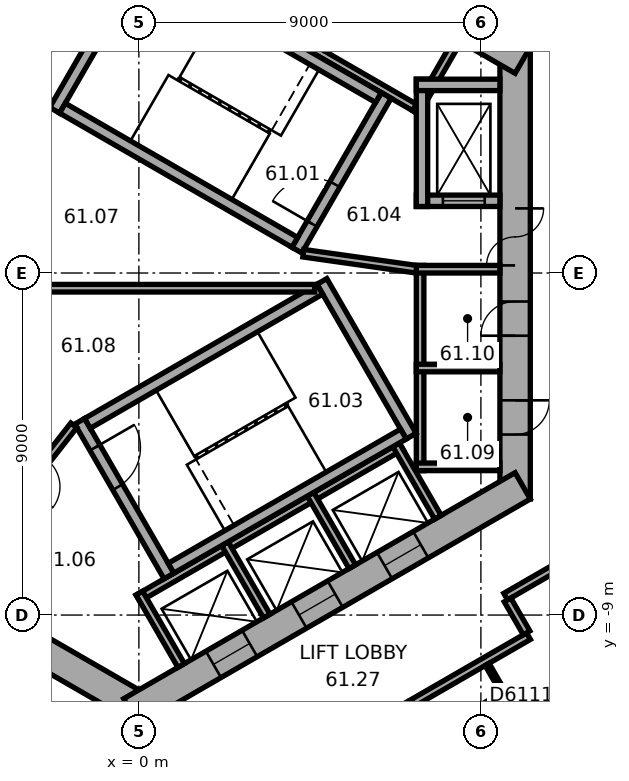
"""IFC4 building model, lengths in metres.
Left out: names, types, materials, properties, quantities, classifications, styles, units other than length and angle.
Written with IfcOpenShell. Run it as: python <this file> out.ifc"""

import sys

from ifc_helpers import new_model, si_unit, direction, frame, frame_2d, origin, place, context, subcontext, project, spatial, rectangle, extrude, element, fill, save


model = new_model("IFC4")
c1 = context("Model", 3, precision=1e-05, world=origin(), true_north=direction((0.0, 1.0)))
c2 = subcontext(c1, "Body", "Model", "MODEL_VIEW")
j1 = project(units=[si_unit("LENGTHUNIT", "METRE"), si_unit("PLANEANGLEUNIT", "RADIAN")], contexts=[c1])
p1 = place(None, origin())
s1 = spatial("IfcSite", under=j1, at=p1, CompositionType="ELEMENT")
p2 = place(p1, origin())
s2 = spatial("IfcBuilding", under=s1, at=p2, CompositionType="ELEMENT")
p3 = place(p2, frame((0.0, 0.0, 247.6)))
s3 = spatial("IfcBuildingStorey", under=s2, at=p3, CompositionType="ELEMENT", Elevation=247.6)
p4 = place(p3, frame((9.9, -5.947, 0.0), z_axis=(0.0, 0.0, 1.0), x_axis=(0.0, 1.0, 0.0)))
e1 = element("IfcWall", 1, at=p4, inside=s3, PredefinedType="SHEAR", context=c2, shape_type="SweptSolid", body=[
    extrude(rectangle(XDim=11.894, YDim=0.8, at=frame_2d((5.947, 0.0))), origin(), (0.0, 0.0, 1.0), 3.7),
])
p5 = place(p4, frame((6.147, 0.0, 0.0)))
e2 = element("IfcOpeningElement", 2, at=p5, cuts=e1, PredefinedType="OPENING", context=c2, shape_type="SweptSolid", body=[
    extrude(rectangle(XDim=1.5, YDim=2.1, at=frame_2d((0.75, 1.05))), frame((0.0, 0.41, 0.0), z_axis=(0.0, -1.0, 0.0), x_axis=(1.0, 0.0, 0.0)), (0.0, 0.0, 1.0), 0.82),
])
p6 = place(p4, frame((1.697, 0.0, 0.0)))
e3 = element("IfcOpeningElement", 3, at=p6, cuts=e1, PredefinedType="OPENING", context=c2, shape_type="SweptSolid", body=[
    extrude(rectangle(XDim=0.9, YDim=2.1, at=frame_2d((0.45, 1.05))), frame((0.0, 0.41, 0.0), z_axis=(0.0, -1.0, 0.0), x_axis=(1.0, 0.0, 0.0)), (0.0, 0.0, 1.0), 0.82),
])
p7 = place(p4, frame((4.297, 0.0, 0.0)))
e4 = element("IfcOpeningElement", 4, at=p7, cuts=e1, PredefinedType="OPENING", context=c2, shape_type="SweptSolid", body=[
    extrude(rectangle(XDim=0.9, YDim=2.1, at=frame_2d((0.45, 1.05))), frame((0.0, 0.41, 0.0), z_axis=(0.0, -1.0, 0.0), x_axis=(1.0, 0.0, 0.0)), (0.0, 0.0, 1.0), 0.82),
])
p8 = place(p3, frame((10.1, 5.6, 0.0), z_axis=(0.0, 0.0, 1.0), x_axis=(-0.866023897231, 0.500002609418, 0.0)))
e5 = element("IfcWall", 5, at=p8, inside=s3, PredefinedType="SHEAR", context=c2, shape_type="SweptSolid", body=[
    extrude(rectangle(XDim=11.894, YDim=0.8, at=frame_2d((5.947, 0.0))), origin(), (0.0, 0.0, 1.0), 3.7),
])
p9 = place(p8, frame((3.897, 0.0, 0.0)))
e6 = element("IfcOpeningElement", 6, at=p9, cuts=e5, PredefinedType="OPENING", context=c2, shape_type="SweptSolid", body=[
    extrude(rectangle(XDim=0.9, YDim=2.1, at=frame_2d((0.45, 1.05))), frame((0.0, 0.41, 0.0), z_axis=(0.0, -1.0, 0.0), x_axis=(1.0, 0.0, 0.0)), (0.0, 0.0, 1.0), 0.82),
])
p10 = place(p8, frame((7.797, 0.0, 0.0)))
e7 = element("IfcOpeningElement", 7, at=p10, cuts=e5, PredefinedType="OPENING", context=c2, shape_type="SweptSolid", body=[
    extrude(rectangle(XDim=0.9, YDim=2.1, at=frame_2d((0.45, 1.05))), frame((0.0, 0.41, 0.0), z_axis=(0.0, -1.0, 0.0), x_axis=(1.0, 0.0, 0.0)), (0.0, 0.0, 1.0), 0.82),
])
p11 = place(p3, frame((0.2, 11.547, 0.0), z_axis=(0.0, 0.0, 1.0), x_axis=(-0.866023897231, -0.500002609418, 0.0)))
e8 = element("IfcWall", 8, at=p11, inside=s3, PredefinedType="SHEAR", context=c2, shape_type="SweptSolid", body=[
    extrude(rectangle(XDim=11.894, YDim=0.8, at=frame_2d((5.947, 0.0))), origin(), (0.0, 0.0, 1.0), 3.7),
])
p12 = place(p11, frame((6.147, 0.0, 0.0)))
e9 = element("IfcOpeningElement", 9, at=p12, cuts=e8, PredefinedType="OPENING", context=c2, shape_type="SweptSolid", body=[
    extrude(rectangle(XDim=1.5, YDim=2.1, at=frame_2d((0.75, 1.05))), frame((0.0, 0.41, 0.0), z_axis=(0.0, -1.0, 0.0), x_axis=(1.0, 0.0, 0.0)), (0.0, 0.0, 1.0), 0.82),
])
p13 = place(p11, frame((1.697, 0.0, 0.0)))
e10 = element("IfcOpeningElement", 10, at=p13, cuts=e8, PredefinedType="OPENING", context=c2, shape_type="SweptSolid", body=[
    extrude(rectangle(XDim=0.9, YDim=2.1, at=frame_2d((0.45, 1.05))), frame((0.0, 0.41, 0.0), z_axis=(0.0, -1.0, 0.0), x_axis=(1.0, 0.0, 0.0)), (0.0, 0.0, 1.0), 0.82),
])
p14 = place(p11, frame((4.297, 0.0, 0.0)))
e11 = element("IfcOpeningElement", 11, at=p14, cuts=e8, PredefinedType="OPENING", context=c2, shape_type="SweptSolid", body=[
    extrude(rectangle(XDim=0.9, YDim=2.1, at=frame_2d((0.45, 1.05))), frame((0.0, 0.41, 0.0), z_axis=(0.0, -1.0, 0.0), x_axis=(1.0, 0.0, 0.0)), (0.0, 0.0, 1.0), 0.82),
])
p15 = place(p3, frame((-10.1, -5.6, 0.0), z_axis=(0.0, 0.0, 1.0), x_axis=(0.866023897231, -0.500002609418, 0.0)))
e12 = element("IfcWall", 12, at=p15, inside=s3, PredefinedType="SHEAR", context=c2, shape_type="SweptSolid", body=[
    extrude(rectangle(XDim=11.894, YDim=0.8, at=frame_2d((5.947, 0.0))), origin(), (0.0, 0.0, 1.0), 3.7),
])
p16 = place(p15, frame((6.147, 0.0, 0.0)))
e13 = element("IfcOpeningElement", 13, at=p16, cuts=e12, PredefinedType="OPENING", context=c2, shape_type="SweptSolid", body=[
    extrude(rectangle(XDim=1.5, YDim=2.1, at=frame_2d((0.75, 1.05))), frame((0.0, 0.41, 0.0), z_axis=(0.0, -1.0, 0.0), x_axis=(1.0, 0.0, 0.0)), (0.0, 0.0, 1.0), 0.82),
])
p17 = place(p15, frame((1.597, 0.0, 0.0)))
e14 = element("IfcOpeningElement", 14, at=p17, cuts=e12, PredefinedType="OPENING", context=c2, shape_type="SweptSolid", body=[
    extrude(rectangle(XDim=1.1, YDim=2.1, at=frame_2d((0.55, 1.05))), frame((0.0, 0.41, 0.0), z_axis=(0.0, -1.0, 0.0), x_axis=(1.0, 0.0, 0.0)), (0.0, 0.0, 1.0), 0.82),
])
p18 = place(p15, frame((4.197, 0.0, 0.0)))
e15 = element("IfcOpeningElement", 15, at=p18, cuts=e12, PredefinedType="OPENING", context=c2, shape_type="SweptSolid", body=[
    extrude(rectangle(XDim=1.1, YDim=2.1, at=frame_2d((0.55, 1.05))), frame((0.0, 0.41, 0.0), z_axis=(0.0, -1.0, 0.0), x_axis=(1.0, 0.0, 0.0)), (0.0, 0.0, 1.0), 0.82),
])
p19 = place(p3, frame((-0.2, -11.547, 0.0), z_axis=(0.0, 0.0, 1.0), x_axis=(0.866023897231, 0.500002609418, 0.0)))
e16 = element("IfcWall", 16, at=p19, inside=s3, PredefinedType="SHEAR", context=c2, shape_type="SweptSolid", body=[
    extrude(rectangle(XDim=11.894, YDim=0.8, at=frame_2d((5.947, 0.0))), origin(), (0.0, 0.0, 1.0), 3.7),
])
p20 = place(p19, frame((2.497, 0.0, 0.0)))
e17 = element("IfcOpeningElement", 17, at=p20, cuts=e16, PredefinedType="OPENING", context=c2, shape_type="SweptSolid", body=[
    extrude(rectangle(XDim=1.1, YDim=2.1, at=frame_2d((0.55, 1.05))), frame((0.0, 0.41, 0.0), z_axis=(0.0, -1.0, 0.0), x_axis=(1.0, 0.0, 0.0)), (0.0, 0.0, 1.0), 0.82),
])
p21 = place(p19, frame((5.097, 0.0, 0.0)))
e18 = element("IfcOpeningElement", 18, at=p21, cuts=e16, PredefinedType="OPENING", context=c2, shape_type="SweptSolid", body=[
    extrude(rectangle(XDim=1.1, YDim=2.1, at=frame_2d((0.55, 1.05))), frame((0.0, 0.41, 0.0), z_axis=(0.0, -1.0, 0.0), x_axis=(1.0, 0.0, 0.0)), (0.0, 0.0, 1.0), 0.82),
])
p22 = place(p19, frame((7.697, 0.0, 0.0)))
e19 = element("IfcOpeningElement", 19, at=p22, cuts=e16, PredefinedType="OPENING", context=c2, shape_type="SweptSolid", body=[
    extrude(rectangle(XDim=1.1, YDim=2.1, at=frame_2d((0.55, 1.05))), frame((0.0, 0.41, 0.0), z_axis=(0.0, -1.0, 0.0), x_axis=(1.0, 0.0, 0.0)), (0.0, 0.0, 1.0), 0.82),
])
p23 = place(p3, frame((7.4, -5.2, 0.0), z_axis=(0.0, 0.0, 1.0), x_axis=(0.0, 1.0, 0.0)))
e20 = element("IfcWall", 20, at=p23, inside=s3, PredefinedType="PARTITIONING", context=c2, shape_type="SweptSolid", body=[
    extrude(rectangle(XDim=5.4, YDim=0.2, at=frame_2d((2.7, 0.0))), origin(), (0.0, 0.0, 1.0), 3.42),
])
for number, where, z_axis, x_axis in (
    (21, (7.3, -5.1, 0.0), (0.0, 0.0, 1.0), (1.0, 0.0, 0.0)),
    (22, (7.3, -2.5, 0.0), (0.0, 0.0, 1.0), (1.0, 0.0, 0.0)),
    (23, (7.3, 0.1, 0.0), (0.0, 0.0, 1.0), (1.0, 0.0, 0.0)),
):
    element("IfcWall", number, at=place(p3, frame(where, z_axis=z_axis, x_axis=x_axis)), inside=s3, PredefinedType="PARTITIONING", context=c2, shape_type="SweptSolid", body=[
        extrude(rectangle(XDim=2.2, YDim=0.2, at=frame_2d((1.1, 0.0))), origin(), (0.0, 0.0, 1.0), 3.42),
    ])
p24 = place(p3, frame((7.424, 4.259, 0.0), z_axis=(0.0, 0.0, 1.0), x_axis=(-0.866026010844, 0.49999894854, 0.0)))
e24 = element("IfcWall", 24, at=p24, inside=s3, PredefinedType="PARTITIONING", context=c2, shape_type="SweptSolid", body=[
    extrude(rectangle(XDim=8.0, YDim=0.2, at=frame_2d((4.0, 0.0))), origin(), (0.0, 0.0, 1.0), 3.42),
])
p25 = place(p3, frame((7.287, 4.222, 0.0), z_axis=(0.0, 0.0, 1.0), x_axis=(0.499946605688, 0.86605622881, 0.0)))
e25 = element("IfcWall", 25, at=p25, inside=s3, PredefinedType="PARTITIONING", context=c2, shape_type="SweptSolid", body=[
    extrude(rectangle(XDim=2.2, YDim=0.2, at=frame_2d((1.1, 0.0))), origin(), (0.0, 0.0, 1.0), 3.42),
])
p26 = place(p3, frame((-0.024, -8.559, 0.0), z_axis=(0.0, 0.0, 1.0), x_axis=(0.866026010844, 0.49999894854, 0.0)))
e26 = element("IfcWall", 26, at=p26, inside=s3, PredefinedType="PARTITIONING", context=c2, shape_type="SweptSolid", body=[
    extrude(rectangle(XDim=8.0, YDim=0.2, at=frame_2d((4.0, 0.0))), origin(), (0.0, 0.0, 1.0), 3.42),
])
for number, where, z_axis, x_axis in (
    (27, (0.013, -8.422, 0.0), (0.0, 0.0, 1.0), (0.5, -0.866, 0.0)),
    (28, (2.264, -7.122, 0.0), (0.0, 0.0, 1.0), (0.5, -0.866, 0.0)),
    (29, (4.516, -5.822, 0.0), (0.0, 0.0, 1.0), (0.5, -0.866, 0.0)),
    (30, (6.768, -4.522, 0.0), (0.0, 0.0, 1.0), (0.5, -0.866, 0.0)),
):
    element("IfcWall", number, at=place(p3, frame(where, z_axis=z_axis, x_axis=x_axis)), inside=s3, PredefinedType="PARTITIONING", context=c2, shape_type="SweptSolid", body=[
        extrude(rectangle(XDim=2.2, YDim=0.2, at=frame_2d((1.1, 0.0))), origin(), (0.0, 0.0, 1.0), 3.42),
    ])
p27 = place(p3, frame((4.158, 0.602, 0.0), z_axis=(0.0, 0.0, 1.0), x_axis=(0.499977259774, 0.866038532462, 0.0)))
e31 = element("IfcWall", 31, at=p27, inside=s3, PredefinedType="SHEAR", context=c2, shape_type="SweptSolid", body=[
    extrude(rectangle(XDim=4.7, YDim=0.3, at=frame_2d((2.35, 0.0))), origin(), (0.0, 0.0, 1.0), 3.42),
])
p28 = place(p27, frame((0.8, 0.0, 0.0)))
e32 = element("IfcOpeningElement", 32, at=p28, cuts=e31, PredefinedType="OPENING", context=c2, shape_type="SweptSolid", body=[
    extrude(rectangle(XDim=1.2, YDim=2.1, at=frame_2d((0.6, 1.05))), frame((0.0, 0.16, 0.0), z_axis=(0.0, -1.0, 0.0), x_axis=(1.0, 0.0, 0.0)), (0.0, 0.0, 1.0), 0.32),
])
p29 = place(p3, frame((-2.216, 4.282, 0.0), z_axis=(0.0, 0.0, 1.0), x_axis=(0.499977259774, 0.866038532462, 0.0)))
e33 = element("IfcWall", 33, at=p29, inside=s3, PredefinedType="SHEAR", context=c2, shape_type="SweptSolid", body=[
    extrude(rectangle(XDim=4.7, YDim=0.3, at=frame_2d((2.35, 0.0))), origin(), (0.0, 0.0, 1.0), 3.42),
])
for number, where, z_axis, x_axis in (
    (34, (4.103, 0.807, 0.0), (0.0, 0.0, 1.0), (-0.866, 0.5, 0.0)),
    (35, (6.303, 4.617, 0.0), (0.0, 0.0, 1.0), (-0.866, 0.5, 0.0)),
):
    element("IfcWall", number, at=place(p3, frame(where, z_axis=z_axis, x_axis=x_axis)), inside=s3, PredefinedType="SHEAR", context=c2, shape_type="SweptSolid", body=[
        extrude(rectangle(XDim=7.06, YDim=0.3, at=frame_2d((3.53, 0.0))), origin(), (0.0, 0.0, 1.0), 3.42),
    ])
p30 = place(p3, frame((-1.558, -3.902, 0.0), z_axis=(0.0, 0.0, 1.0), x_axis=(0.499977259774, -0.866038532462, 0.0)))
e36 = element("IfcWall", 36, at=p30, inside=s3, PredefinedType="SHEAR", context=c2, shape_type="SweptSolid", body=[
    extrude(rectangle(XDim=4.7, YDim=0.3, at=frame_2d((2.35, 0.0))), origin(), (0.0, 0.0, 1.0), 3.42),
])
p31 = place(p30, frame((0.8, 0.0, 0.0)))
e37 = element("IfcOpeningElement", 37, at=p31, cuts=e36, PredefinedType="OPENING", context=c2, shape_type="SweptSolid", body=[
    extrude(rectangle(XDim=1.2, YDim=2.1, at=frame_2d((0.6, 1.05))), frame((0.0, 0.16, 0.0), z_axis=(0.0, -1.0, 0.0), x_axis=(1.0, 0.0, 0.0)), (0.0, 0.0, 1.0), 0.32),
])
p32 = place(p3, frame((4.816, -0.222, 0.0), z_axis=(0.0, 0.0, 1.0), x_axis=(0.499977259774, -0.866038532462, 0.0)))
e38 = element("IfcWall", 38, at=p32, inside=s3, PredefinedType="SHEAR", context=c2, shape_type="SweptSolid", body=[
    extrude(rectangle(XDim=4.7, YDim=0.3, at=frame_2d((2.35, 0.0))), origin(), (0.0, 0.0, 1.0), 3.42),
])
for number, where, z_axis, x_axis in (
    (39, (-1.353, -3.957, 0.0), (0.0, 0.0, 1.0), (0.866, 0.5, 0.0)),
    (40, (0.847, -7.767, 0.0), (0.0, 0.0, 1.0), (0.866, 0.5, 0.0)),
):
    element("IfcWall", number, at=place(p3, frame(where, z_axis=z_axis, x_axis=x_axis)), inside=s3, PredefinedType="SHEAR", context=c2, shape_type="SweptSolid", body=[
        extrude(rectangle(XDim=7.06, YDim=0.3, at=frame_2d((3.53, 0.0))), origin(), (0.0, 0.0, 1.0), 3.42),
    ])
p33 = place(p3, frame((7.3, 1.9, 0.0), z_axis=(0.0, 0.0, 1.0), x_axis=(1.0, 0.0, 0.0)))
e41 = element("IfcWall", 41, at=p33, inside=s3, PredefinedType="SHEAR", context=c2, shape_type="SweptSolid", body=[
    extrude(rectangle(XDim=2.2, YDim=0.3, at=frame_2d((1.1, 0.0))), origin(), (0.0, 0.0, 1.0), 3.42),
])
p34 = place(p33, frame((0.7, 0.0, 0.0)))
e42 = element("IfcOpeningElement", 42, at=p34, cuts=e41, PredefinedType="OPENING", context=c2, shape_type="SweptSolid", body=[
    extrude(rectangle(XDim=1.1, YDim=2.1, at=frame_2d((0.55, 1.05))), frame((0.0, 0.16, 0.0), z_axis=(0.0, -1.0, 0.0), x_axis=(1.0, 0.0, 0.0)), (0.0, 0.0, 1.0), 0.32),
])
p35 = place(p3, frame((7.45, 1.75, 0.0), z_axis=(0.0, 0.0, 1.0), x_axis=(0.0, 1.0, 0.0)))
e43 = element("IfcWall", 43, at=p35, inside=s3, PredefinedType="SHEAR", context=c2, shape_type="SweptSolid", body=[
    extrude(rectangle(XDim=3.35, YDim=0.3, at=frame_2d((1.675, 0.0))), origin(), (0.0, 0.0, 1.0), 3.42),
])
p36 = place(p3, frame((7.3, 4.95, 0.0), z_axis=(0.0, 0.0, 1.0), x_axis=(1.0, 0.0, 0.0)))
e44 = element("IfcWall", 44, at=p36, inside=s3, PredefinedType="SHEAR", context=c2, shape_type="SweptSolid", body=[
    extrude(rectangle(XDim=2.2, YDim=0.3, at=frame_2d((1.1, 0.0))), origin(), (0.0, 0.0, 1.0), 3.42),
])
p37 = place(p3, frame((4.327, 0.521, 0.0), z_axis=(0.0, 0.0, 1.0), x_axis=(0.990124376366, -0.14019172346, 0.0)))
e45 = element("IfcWall", 45, at=p37, inside=s3, PredefinedType="PARTITIONING", context=c2, shape_type="SweptSolid", body=[
    extrude(rectangle(XDim=3.002, YDim=0.2, at=frame_2d((1.501, 0.0))), origin(), (0.0, 0.0, 1.0), 3.42),
])
p38 = place(p3, frame((-1.712, -4.008, 0.0), z_axis=(0.0, 0.0, 1.0), x_axis=(-0.616549420702, -0.787316208287, 0.0)))
e46 = element("IfcWall", 46, at=p38, inside=s3, PredefinedType="PARTITIONING", context=c2, shape_type="SweptSolid", body=[
    extrude(rectangle(XDim=3.002, YDim=0.2, at=frame_2d((1.501, 0.0))), origin(), (0.0, 0.0, 1.0), 3.42),
])
p39 = place(p38, frame((1.15, 0.0, 0.0)))
e47 = element("IfcOpeningElement", 47, at=p39, cuts=e46, PredefinedType="OPENING", context=c2, shape_type="SweptSolid", body=[
    extrude(rectangle(XDim=0.9, YDim=2.1, at=frame_2d((0.45, 1.05))), frame((0.0, 0.11, 0.0), z_axis=(0.0, -1.0, 0.0), x_axis=(1.0, 0.0, 0.0)), (0.0, 0.0, 1.0), 0.22),
])
p40 = place(p3, frame((-2.72, -0.4, 0.0), z_axis=(0.0, 0.0, 1.0), x_axis=(1.0, 0.0, 0.0)))
e48 = element("IfcWall", 48, at=p40, inside=s3, PredefinedType="PARTITIONING", context=c2, shape_type="SweptSolid", body=[
    extrude(rectangle(XDim=7.347, YDim=0.2, at=frame_2d((3.674, 0.0))), origin(), (0.0, 0.0, 1.0), 3.42),
])
p41 = place(p3, frame((7.208, -11.312, 0.0), z_axis=(0.0, 0.0, 1.0), x_axis=(0.866050243185, 0.499956974429, 0.0)))
e49 = element("IfcWall", 49, at=p41, inside=s3, PredefinedType="PARTITIONING", context=c2, shape_type="SweptSolid", body=[
    extrude(rectangle(XDim=3.514, YDim=0.2, at=frame_2d((1.757, 0.0))), origin(), (0.0, 0.0, 1.0), 3.42),
])
p42 = place(p3, frame((9.164, -10.299, 0.0), z_axis=(0.0, 0.0, 1.0), x_axis=(0.500004234368, -0.866022959057, 0.0)))
e50 = element("IfcWall", 50, at=p42, inside=s3, PredefinedType="PARTITIONING", context=c2, shape_type="SweptSolid", body=[
    extrude(rectangle(XDim=2.5, YDim=0.12, at=frame_2d((1.25, 0.0))), origin(), (0.0, 0.0, 1.0), 3.42),
])
p43 = place(p42, frame((0.8, 0.0, 0.0)))
e51 = element("IfcOpeningElement", 51, at=p43, cuts=e50, PredefinedType="OPENING", context=c2, shape_type="SweptSolid", body=[
    extrude(rectangle(XDim=0.9, YDim=2.1, at=frame_2d((0.45, 1.05))), frame((0.0, 0.07, 0.0), z_axis=(0.0, -1.0, 0.0), x_axis=(1.0, 0.0, 0.0)), (0.0, 0.0, 1.0), 0.14),
])
p44 = place(p3, frame((9.652, -8.515, 0.0), z_axis=(0.0, 0.0, 1.0), x_axis=(0.866020375458, 0.500008709215, 0.0)))
e52 = element("IfcWall", 52, at=p44, inside=s3, PredefinedType="PARTITIONING", context=c2, shape_type="SweptSolid", body=[
    extrude(rectangle(XDim=1.846, YDim=0.2, at=frame_2d((0.923, 0.0))), origin(), (0.0, 0.0, 1.0), 3.42),
])
p45 = place(p3, frame((10.202, -9.469, 0.0), z_axis=(0.0, 0.0, 1.0), x_axis=(-0.499968756647, 0.866043441391, 0.0)))
e53 = element("IfcWall", 53, at=p45, inside=s3, PredefinedType="PARTITIONING", context=c2, shape_type="SweptSolid", body=[
    extrude(rectangle(XDim=1.001, YDim=0.2, at=frame_2d((0.5, 0.0))), origin(), (0.0, 0.0, 1.0), 3.42),
])
p46 = place(p5, origin())
e54 = element("IfcDoor", 54, at=p46, inside=s3, OperationType="DOUBLE_DOOR_SINGLE_SWING", PredefinedType="DOOR", context=c2, shape_type="SweptSolid", body=[
    extrude(rectangle(XDim=1.5, YDim=2.1, at=frame_2d((0.75, 1.05))), frame((0.0, 0.025, 0.0), z_axis=(0.0, -1.0, 0.0), x_axis=(1.0, 0.0, 0.0)), (0.0, 0.0, 1.0), 0.05),
])
fill(e2, e54)
p47 = place(p28, origin())
e55 = element("IfcDoor", 55, at=p47, inside=s3, OperationType="SINGLE_SWING_RIGHT", PredefinedType="DOOR", context=c2, shape_type="SweptSolid", body=[
    extrude(rectangle(XDim=1.2, YDim=2.1, at=frame_2d((0.6, 1.05))), frame((0.0, 0.025, 0.0), z_axis=(0.0, -1.0, 0.0), x_axis=(1.0, 0.0, 0.0)), (0.0, 0.0, 1.0), 0.05),
])
fill(e32, e55)
p48 = place(p31, origin())
e56 = element("IfcDoor", 56, at=p48, inside=s3, OperationType="SINGLE_SWING_RIGHT", PredefinedType="DOOR", context=c2, shape_type="SweptSolid", body=[
    extrude(rectangle(XDim=1.2, YDim=2.1, at=frame_2d((0.6, 1.05))), frame((0.0, 0.025, 0.0), z_axis=(0.0, -1.0, 0.0), x_axis=(1.0, 0.0, 0.0)), (0.0, 0.0, 1.0), 0.05),
])
fill(e37, e56)
p49 = place(p6, origin())
e57 = element("IfcDoor", 57, at=p49, inside=s3, OperationType="SINGLE_SWING_LEFT", PredefinedType="DOOR", context=c2, shape_type="SweptSolid", body=[
    extrude(rectangle(XDim=0.9, YDim=2.1, at=frame_2d((0.45, 1.05))), frame((0.0, 0.025, 0.0), z_axis=(0.0, -1.0, 0.0), x_axis=(1.0, 0.0, 0.0)), (0.0, 0.0, 1.0), 0.05),
])
fill(e3, e57)
p50 = place(p7, origin())
e58 = element("IfcDoor", 58, at=p50, inside=s3, OperationType="SINGLE_SWING_LEFT", PredefinedType="DOOR", context=c2, shape_type="SweptSolid", body=[
    extrude(rectangle(XDim=0.9, YDim=2.1, at=frame_2d((0.45, 1.05))), frame((0.0, 0.025, 0.0), z_axis=(0.0, -1.0, 0.0), x_axis=(1.0, 0.0, 0.0)), (0.0, 0.0, 1.0), 0.05),
])
fill(e4, e58)
p51 = place(p34, origin())
e59 = element("IfcDoor", 59, at=p51, inside=s3, OperationType="DOUBLE_DOOR_SLIDING", PredefinedType="DOOR", context=c2, shape_type="SweptSolid", body=[
    extrude(rectangle(XDim=1.1, YDim=2.1, at=frame_2d((0.55, 1.05))), frame((0.0, 0.025, 0.0), z_axis=(0.0, -1.0, 0.0), x_axis=(1.0, 0.0, 0.0)), (0.0, 0.0, 1.0), 0.05),
])
fill(e42, e59)
p52 = place(p20, origin())
e60 = element("IfcDoor", 60, at=p52, inside=s3, OperationType="DOUBLE_DOOR_SLIDING", PredefinedType="DOOR", context=c2, shape_type="SweptSolid", body=[
    extrude(rectangle(XDim=1.1, YDim=2.1, at=frame_2d((0.55, 1.05))), frame((0.0, 0.025, 0.0), z_axis=(0.0, -1.0, 0.0), x_axis=(1.0, 0.0, 0.0)), (0.0, 0.0, 1.0), 0.05),
])
fill(e17, e60)
p53 = place(p21, origin())
e61 = element("IfcDoor", 61, at=p53, inside=s3, OperationType="DOUBLE_DOOR_SLIDING", PredefinedType="DOOR", context=c2, shape_type="SweptSolid", body=[
    extrude(rectangle(XDim=1.1, YDim=2.1, at=frame_2d((0.55, 1.05))), frame((0.0, 0.025, 0.0), z_axis=(0.0, -1.0, 0.0), x_axis=(1.0, 0.0, 0.0)), (0.0, 0.0, 1.0), 0.05),
])
fill(e18, e61)
p54 = place(p22, origin())
e62 = element("IfcDoor", 62, at=p54, inside=s3, OperationType="DOUBLE_DOOR_SLIDING", PredefinedType="DOOR", context=c2, shape_type="SweptSolid", body=[
    extrude(rectangle(XDim=1.1, YDim=2.1, at=frame_2d((0.55, 1.05))), frame((0.0, 0.025, 0.0), z_axis=(0.0, -1.0, 0.0), x_axis=(1.0, 0.0, 0.0)), (0.0, 0.0, 1.0), 0.05),
])
fill(e19, e62)
p55 = place(p43, origin())
e63 = element("IfcDoor", 63, at=p55, inside=s3, OperationType="SINGLE_SWING_LEFT", PredefinedType="DOOR", context=c2, shape_type="SweptSolid", body=[
    extrude(rectangle(XDim=0.9, YDim=2.1, at=frame_2d((0.45, 1.05))), frame((0.0, 0.025, 0.0), z_axis=(0.0, -1.0, 0.0), x_axis=(1.0, 0.0, 0.0)), (0.0, 0.0, 1.0), 0.05),
])
fill(e51, e63)
save(model, sys.argv[1])
